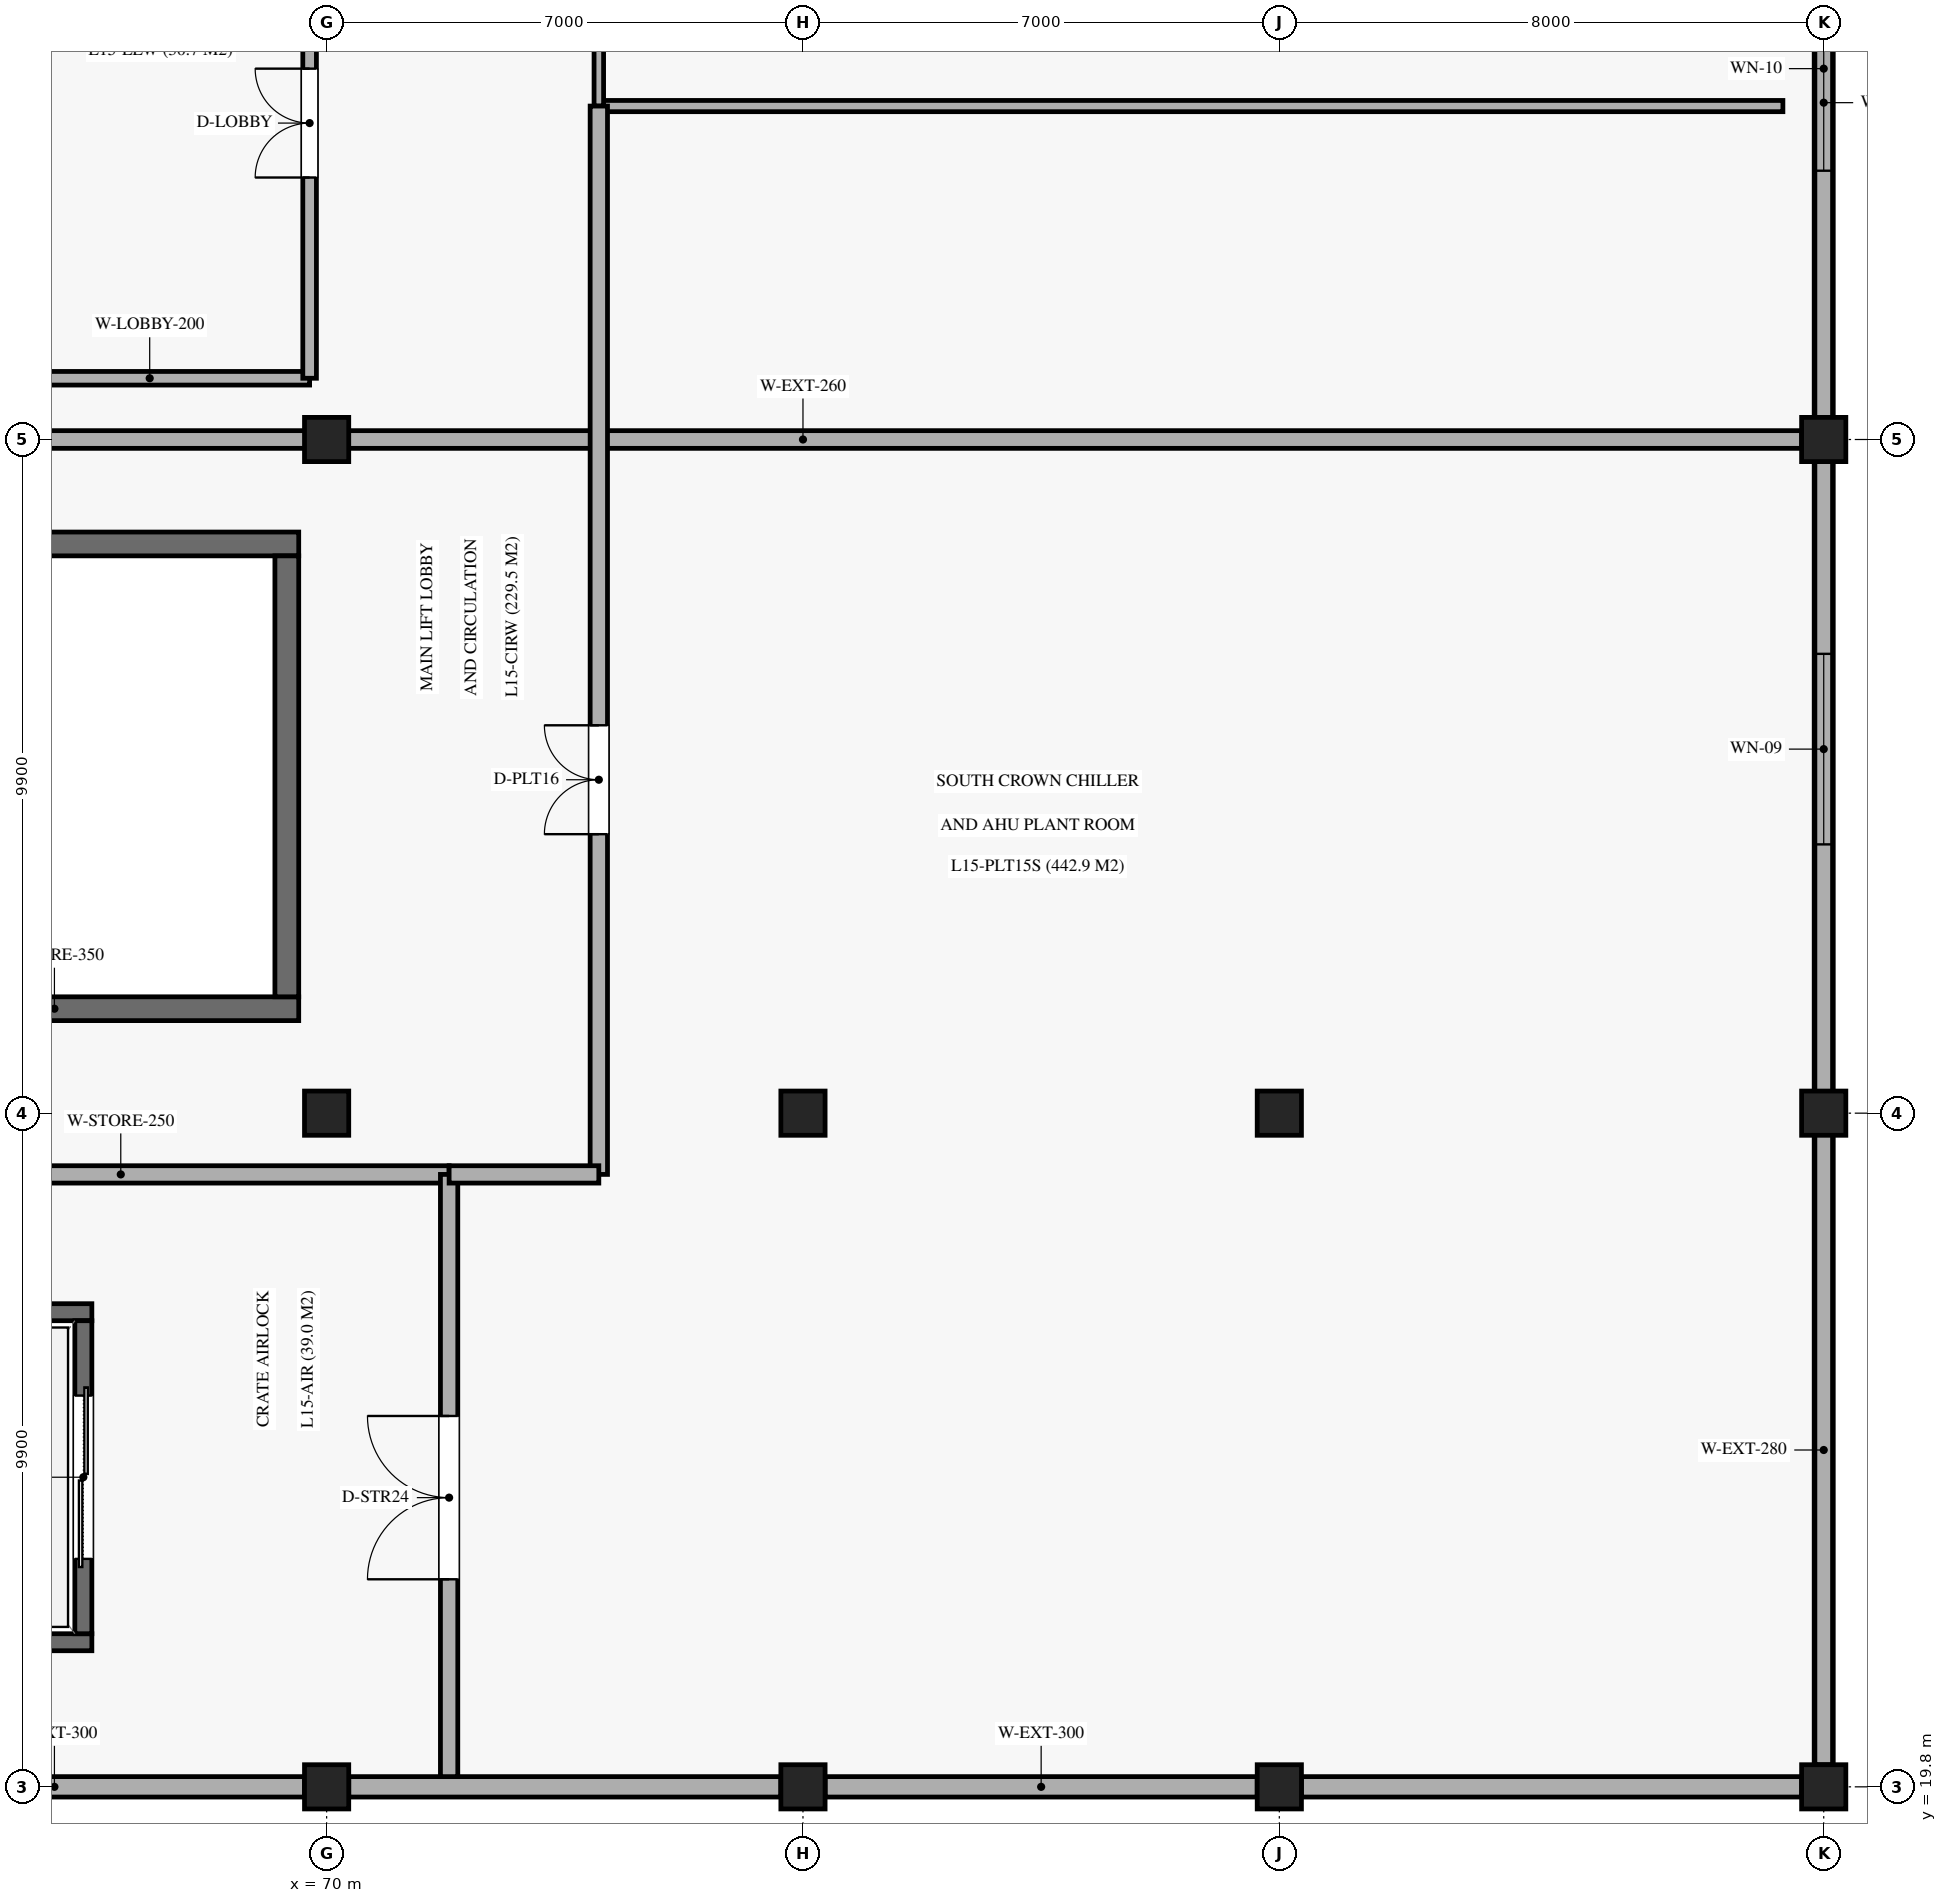
"""IFC4 building model, lengths in metres.
Left out: names, types, materials, properties, quantities, classifications, styles, units other than length and angle.
Written with IfcOpenShell. Run it as: python <this file> out.ifc"""

import sys

from ifc_helpers import new_model, si_unit, direction, frame, frame_2d, origin, origin_2d, place, context, subcontext, project, spatial, polyline, rectangle, outline, extrude, element, fill, save


model = new_model("IFC4")
c1 = context("Model", 3, precision=1e-05, world=origin(), true_north=direction((0.0, 1.0)))
c2 = subcontext(c1, "Body", "Model", "MODEL_VIEW")
j1 = project(units=[si_unit("LENGTHUNIT", "METRE"), si_unit("PLANEANGLEUNIT", "RADIAN")], contexts=[c1])
p1 = place(None, origin())
s1 = spatial("IfcSite", under=j1, at=p1, CompositionType="ELEMENT")
p2 = place(p1, origin())
s2 = spatial("IfcBuilding", under=s1, at=p2, CompositionType="ELEMENT")
p3 = place(p2, frame((0.0, 0.0, 74.46)))
s3 = spatial("IfcBuildingStorey", under=s2, at=p3, CompositionType="ELEMENT", Elevation=74.46)
for number, where, z_axis, x_axis in (
    (1, (70.0, 19.8, 0.0), (0.0, 0.0, 1.0), (1.0, 0.0, 0.0)),
    (2, (70.0, 29.7, 0.0), (0.0, 0.0, 1.0), (1.0, 0.0, 0.0)),
):
    element("IfcColumn", number, at=place(p3, frame(where, z_axis=z_axis, x_axis=x_axis)), inside=s3, PredefinedType="COLUMN", context=c2, shape_type="SweptSolid", body=[
        extrude(rectangle(XDim=0.65, YDim=0.65, at=origin_2d()), origin(), (0.0, 0.0, 1.0), 4.04),
    ])
p4 = place(p3, frame((70.0, 39.6, 0.0), z_axis=(0.0, 0.0, 1.0), x_axis=(1.0, 0.0, 0.0)))
e3 = element("IfcColumn", 3, at=p4, inside=s3, PredefinedType="COLUMN", context=c2, shape_type="SweptSolid", body=[
    extrude(rectangle(XDim=0.65, YDim=0.65, at=origin_2d()), origin(), (0.0, 0.0, 1.0), 5.66),
])
for number, where, z_axis, x_axis in (
    (4, (77.0, 19.8, 0.0), (0.0, 0.0, 1.0), (1.0, 0.0, 0.0)),
    (5, (77.0, 29.7, 0.0), (0.0, 0.0, 1.0), (1.0, 0.0, 0.0)),
    (6, (84.0, 19.8, 0.0), (0.0, 0.0, 1.0), (1.0, 0.0, 0.0)),
    (7, (84.0, 29.7, 0.0), (0.0, 0.0, 1.0), (1.0, 0.0, 0.0)),
    (8, (92.0, 19.8, 0.0), (0.0, 0.0, 1.0), (1.0, 0.0, 0.0)),
    (9, (92.0, 29.7, 0.0), (0.0, 0.0, 1.0), (1.0, 0.0, 0.0)),
):
    element("IfcColumn", number, at=place(p3, frame(where, z_axis=z_axis, x_axis=x_axis)), inside=s3, PredefinedType="COLUMN", context=c2, shape_type="SweptSolid", body=[
        extrude(rectangle(XDim=0.65, YDim=0.65, at=origin_2d()), origin(), (0.0, 0.0, 1.0), 4.04),
    ])
p5 = place(p3, frame((92.0, 39.6, 0.0), z_axis=(0.0, 0.0, 1.0), x_axis=(1.0, 0.0, 0.0)))
e10 = element("IfcColumn", 10, at=p5, inside=s3, PredefinedType="COLUMN", context=c2, shape_type="SweptSolid", body=[
    extrude(rectangle(XDim=0.65, YDim=0.65, at=origin_2d()), origin(), (0.0, 0.0, 1.0), 5.66),
])
p6 = place(p3, frame((92.0, 20.125, 0.0), z_axis=(0.0, 0.0, 1.0), x_axis=(0.0, 1.0, 0.0)))
e11 = element("IfcWall", 11, at=p6, inside=s3, PredefinedType="SOLIDWALL", context=c2, shape_type="SweptSolid", body=[
    extrude(rectangle(XDim=9.25, YDim=0.28, at=frame_2d((4.625, 0.0))), origin(), (0.0, 0.0, 1.0), 3.29),
])
p7 = place(p3, frame((92.0, 30.025, 0.0), z_axis=(0.0, 0.0, 1.0), x_axis=(0.0, 1.0, 0.0)))
e12 = element("IfcWall", 12, at=p7, inside=s3, PredefinedType="SOLIDWALL", context=c2, shape_type="SweptSolid", body=[
    extrude(rectangle(XDim=9.25, YDim=0.28, at=frame_2d((4.625, 0.0))), origin(), (0.0, 0.0, 1.0), 3.29),
])
p8 = place(p7, frame((3.625, 0.0, 1.45)))
e13 = element("IfcOpeningElement", 13, at=p8, cuts=e12, PredefinedType="OPENING", context=c2, shape_type="SweptSolid", body=[
    extrude(rectangle(XDim=2.8, YDim=1.9, at=frame_2d((1.4, 0.95))), frame((0.0, 0.15, 0.0), z_axis=(0.0, -1.0, 0.0), x_axis=(1.0, 0.0, 0.0)), (0.0, 0.0, 1.0), 0.3),
])
p9 = place(p3, frame((92.0, 39.925, 0.0), z_axis=(0.0, 0.0, 1.0), x_axis=(0.0, 1.0, 0.0)))
e14 = element("IfcWall", 14, at=p9, inside=s3, PredefinedType="SOLIDWALL", context=c2, shape_type="SweptSolid", body=[
    extrude(rectangle(XDim=9.25, YDim=0.28, at=frame_2d((4.625, 0.0))), origin(), (0.0, 0.0, 1.0), 3.29),
])
p10 = place(p9, frame((3.625, 0.0, 1.45)))
e15 = element("IfcOpeningElement", 15, at=p10, cuts=e14, PredefinedType="OPENING", context=c2, shape_type="SweptSolid", body=[
    extrude(rectangle(XDim=3.0, YDim=1.95, at=frame_2d((1.5, 0.975))), frame((0.0, 0.15, 0.0), z_axis=(0.0, -1.0, 0.0), x_axis=(1.0, 0.0, 0.0)), (0.0, 0.0, 1.0), 0.3),
])
p11 = place(p3, frame((62.325, 19.8, 0.0), z_axis=(0.0, 0.0, 1.0), x_axis=(1.0, 0.0, 0.0)))
e16 = element("IfcWall", 16, at=p11, inside=s3, PredefinedType="SOLIDWALL", context=c2, shape_type="SweptSolid", body=[
    extrude(rectangle(XDim=7.35, YDim=0.3, at=frame_2d((3.675, 0.0))), origin(), (0.0, 0.0, 1.0), 3.29),
])
for number, where, z_axis, x_axis in (
    (17, (70.325, 19.8, 0.0), (0.0, 0.0, 1.0), (1.0, 0.0, 0.0)),
    (18, (77.325, 19.8, 0.0), (0.0, 0.0, 1.0), (1.0, 0.0, 0.0)),
):
    element("IfcWall", number, at=place(p3, frame(where, z_axis=z_axis, x_axis=x_axis)), inside=s3, PredefinedType="SOLIDWALL", context=c2, shape_type="SweptSolid", body=[
        extrude(rectangle(XDim=6.35, YDim=0.3, at=frame_2d((3.175, 0.0))), origin(), (0.0, 0.0, 1.0), 3.29),
    ])
p12 = place(p3, frame((84.325, 19.8, 0.0), z_axis=(0.0, 0.0, 1.0), x_axis=(1.0, 0.0, 0.0)))
e19 = element("IfcWall", 19, at=p12, inside=s3, PredefinedType="SOLIDWALL", context=c2, shape_type="SweptSolid", body=[
    extrude(rectangle(XDim=7.35, YDim=0.3, at=frame_2d((3.675, 0.0))), origin(), (0.0, 0.0, 1.0), 3.29),
])
p13 = place(p3, frame((62.325, 39.6, 4.04), z_axis=(0.0, 0.0, 1.0), x_axis=(1.0, 0.0, 0.0)))
e20 = element("IfcWall", 20, at=p13, inside=s3, PredefinedType="SOLIDWALL", context=c2, shape_type="SweptSolid", body=[
    extrude(rectangle(XDim=29.35, YDim=0.26, at=frame_2d((14.675, 0.0))), origin(), (0.0, 0.0, 1.0), 1.135),
])
p14 = place(p3, frame((92.0, 20.125, 4.04), z_axis=(0.0, 0.0, 1.0), x_axis=(0.0, 1.0, 0.0)))
e21 = element("IfcWall", 21, at=p14, inside=s3, PredefinedType="SOLIDWALL", context=c2, shape_type="SweptSolid", body=[
    extrude(outline(polyline([(0.0, 0.0), (19.15, 0.0), (19.15, 1.72), (0.0, 0.08), (0.0, 0.0)])), frame((0.0, 0.13, 0.0), z_axis=(0.0, -1.0, 0.0), x_axis=(1.0, 0.0, 0.0)), (0.0, 0.0, 1.0), 0.26),
])
p15 = place(p3, frame((92.0, 39.925, 4.04), z_axis=(0.0, 0.0, 1.0), x_axis=(0.0, 1.0, 0.0)))
e22 = element("IfcWall", 22, at=p15, inside=s3, PredefinedType="SOLIDWALL", context=c2, shape_type="SweptSolid", body=[
    extrude(outline(polyline([(0.0, 0.0), (9.25, 0.0), (9.25, 3.62), (0.0, 0.1), (0.0, 0.0)])), frame((0.0, 0.13, 0.0), z_axis=(0.0, -1.0, 0.0), x_axis=(1.0, 0.0, 0.0)), (0.0, 0.0, 1.0), 0.26),
])
p16 = place(p3, frame((92.35, 39.71, 0.0), z_axis=(0.0, 0.0, 1.0), x_axis=(1.0, 0.0, 0.0)))
e23 = element("IfcWall", 23, at=p16, inside=s3, PredefinedType="PARAPET", context=c2, shape_type="SweptSolid", body=[
    extrude(rectangle(XDim=5.3, YDim=0.22, at=frame_2d((2.65, 0.0))), origin(), (0.0, 0.0, 1.0), 0.48),
])
p17 = place(p3, frame((62.41, 31.235, 0.0), z_axis=(0.0, 0.0, 1.0), x_axis=(1.0, 0.0, 0.0)))
e24 = element("IfcWall", 24, at=p17, inside=s3, PredefinedType="SHEAR", context=c2, shape_type="SweptSolid", body=[
    extrude(rectangle(XDim=7.18, YDim=0.35, at=frame_2d((3.59, 0.0))), origin(), (0.0, 0.0, 1.0), 4.04),
])
p18 = place(p17, frame((0.77, 0.0, 0.0)))
e25 = element("IfcOpeningElement", 25, at=p18, cuts=e24, PredefinedType="OPENING", context=c2, shape_type="SweptSolid", body=[
    extrude(rectangle(XDim=1.2, YDim=2.2, at=frame_2d((0.6, 1.1))), frame((0.0, 0.185, 0.0), z_axis=(0.0, -1.0, 0.0), x_axis=(1.0, 0.0, 0.0)), (0.0, 0.0, 1.0), 0.37),
])
p19 = place(p3, frame((62.41, 38.065, 0.0), z_axis=(0.0, 0.0, 1.0), x_axis=(1.0, 0.0, 0.0)))
e26 = element("IfcWall", 26, at=p19, inside=s3, PredefinedType="SHEAR", context=c2, shape_type="SweptSolid", body=[
    extrude(rectangle(XDim=7.18, YDim=0.35, at=frame_2d((3.59, 0.0))), origin(), (0.0, 0.0, 1.0), 4.04),
])
p20 = place(p3, frame((69.415, 31.41, 0.0), z_axis=(0.0, 0.0, 1.0), x_axis=(0.0, 1.0, 0.0)))
e27 = element("IfcWall", 27, at=p20, inside=s3, PredefinedType="SHEAR", context=c2, shape_type="SweptSolid", body=[
    extrude(rectangle(XDim=6.48, YDim=0.35, at=frame_2d((3.24, 0.0))), origin(), (0.0, 0.0, 1.0), 4.04),
])
for number, where, z_axis, x_axis in (
    (28, (62.65, 21.925, 0.0), (0.0, 0.0, 1.0), (1.0, 0.0, 0.0)),
    (29, (62.65, 26.775, 0.0), (0.0, 0.0, 1.0), (1.0, 0.0, 0.0)),
):
    element("IfcWall", number, at=place(p3, frame(where, z_axis=z_axis, x_axis=x_axis)), inside=s3, PredefinedType="SOLIDWALL", context=c2, shape_type="SweptSolid", body=[
        extrude(rectangle(XDim=3.9, YDim=0.25, at=frame_2d((1.95, 0.0))), origin(), (0.0, 0.0, 1.0), 4.02),
    ])
p21 = place(p3, frame((66.425, 22.05, 0.0), z_axis=(0.0, 0.0, 1.0), x_axis=(0.0, 1.0, 0.0)))
e30 = element("IfcWall", 30, at=p21, inside=s3, PredefinedType="SOLIDWALL", context=c2, shape_type="SweptSolid", body=[
    extrude(rectangle(XDim=4.6, YDim=0.25, at=frame_2d((2.3, 0.0))), origin(), (0.0, 0.0, 1.0), 4.02),
])
p22 = place(p21, frame((1.1, 0.0, 0.0)))
e31 = element("IfcOpeningElement", 31, at=p22, cuts=e30, PredefinedType="OPENING", context=c2, shape_type="SweptSolid", body=[
    extrude(rectangle(XDim=2.4, YDim=2.65, at=frame_2d((1.2, 1.325))), frame((0.0, 0.135, 0.0), z_axis=(0.0, -1.0, 0.0), x_axis=(1.0, 0.0, 0.0)), (0.0, 0.0, 1.0), 0.27),
])
p23 = place(p3, frame((65.05, 40.5, 0.0), z_axis=(0.0, 0.0, 1.0), x_axis=(1.0, 0.0, 0.0)))
e32 = element("IfcWall", 32, at=p23, inside=s3, PredefinedType="SOLIDWALL", context=c2, shape_type="SweptSolid", body=[
    extrude(rectangle(XDim=4.7, YDim=0.2, at=frame_2d((2.35, 0.0))), origin(), (0.0, 0.0, 1.0), 3.16),
])
p24 = place(p3, frame((69.75, 40.5, 0.0), z_axis=(0.0, 0.0, 1.0), x_axis=(0.0, 1.0, 0.0)))
e33 = element("IfcWall", 33, at=p24, inside=s3, PredefinedType="SOLIDWALL", context=c2, shape_type="SweptSolid", body=[
    extrude(rectangle(XDim=7.5, YDim=0.2, at=frame_2d((3.75, 0.0))), origin(), (0.0, 0.0, 1.0), 3.16),
])
p25 = place(p24, frame((2.95, 0.0, 0.0)))
e34 = element("IfcOpeningElement", 34, at=p25, cuts=e33, PredefinedType="OPENING", context=c2, shape_type="SweptSolid", body=[
    extrude(rectangle(XDim=1.6, YDim=2.2, at=frame_2d((0.8, 1.1))), frame((0.0, 0.11, 0.0), z_axis=(0.0, -1.0, 0.0), x_axis=(1.0, 0.0, 0.0)), (0.0, 0.0, 1.0), 0.22),
])
p26 = place(p3, frame((62.15, 28.8, 0.0), z_axis=(0.0, 0.0, 1.0), x_axis=(1.0, 0.0, 0.0)))
e35 = element("IfcWall", 35, at=p26, inside=s3, PredefinedType="SOLIDWALL", context=c2, shape_type="SweptSolid", body=[
    extrude(rectangle(XDim=9.65, YDim=0.255, at=frame_2d((4.825, 0.0))), origin(), (0.0, 0.0, 1.0), 3.16),
])
p27 = place(p3, frame((71.8, 19.95, 0.0), z_axis=(0.0, 0.0, 1.0), x_axis=(0.0, 1.0, 0.0)))
e36 = element("IfcWall", 36, at=p27, inside=s3, PredefinedType="SOLIDWALL", context=c2, shape_type="SweptSolid", body=[
    extrude(rectangle(XDim=8.85, YDim=0.255, at=frame_2d((4.425, 0.0))), origin(), (0.0, 0.0, 1.0), 3.16),
])
p28 = place(p27, frame((2.9, 0.0, 0.0)))
e37 = element("IfcOpeningElement", 37, at=p28, cuts=e36, PredefinedType="OPENING", context=c2, shape_type="SweptSolid", body=[
    extrude(rectangle(XDim=2.4, YDim=2.5, at=frame_2d((1.2, 1.25))), frame((0.0, 0.137, 0.0), z_axis=(0.0, -1.0, 0.0), x_axis=(1.0, 0.0, 0.0)), (0.0, 0.0, 1.0), 0.275),
])
p29 = place(p3, frame((74.0, 44.5, 0.0), z_axis=(0.0, 0.0, 1.0), x_axis=(1.0, 0.0, 0.0)))
e38 = element("IfcWall", 38, at=p29, inside=s3, PredefinedType="PARTITIONING", context=c2, shape_type="SweptSolid", body=[
    extrude(rectangle(XDim=17.4, YDim=0.165, at=frame_2d((8.7, 0.0))), origin(), (0.0, 0.0, 1.0), 3.16),
])
p30 = place(p3, frame((74.0, 44.5, 0.0), z_axis=(0.0, 0.0, 1.0), x_axis=(0.0, 1.0, 0.0)))
e39 = element("IfcWall", 39, at=p30, inside=s3, PredefinedType="PARTITIONING", context=c2, shape_type="SweptSolid", body=[
    extrude(rectangle(XDim=39.5, YDim=0.14, at=frame_2d((19.75, 0.0))), origin(), (0.0, 0.0, 1.0), 3.16),
])
p31 = place(p30, frame((16.0, 0.0, 0.0)))
e40 = element("IfcOpeningElement", 40, at=p31, cuts=e39, PredefinedType="OPENING", context=c2, shape_type="SweptSolid", body=[
    extrude(rectangle(XDim=2.0, YDim=2.5, at=frame_2d((1.0, 1.25))), frame((0.0, 0.08, 0.0), z_axis=(0.0, -1.0, 0.0), x_axis=(1.0, 0.0, 0.0)), (0.0, 0.0, 1.0), 0.16),
])
p32 = place(p3, frame((74.0, 28.8, 0.0), z_axis=(0.0, 0.0, 1.0), x_axis=(0.0, 1.0, 0.0)))
e41 = element("IfcWall", 41, at=p32, inside=s3, PredefinedType="SOLIDWALL", context=c2, shape_type="SweptSolid", body=[
    extrude(rectangle(XDim=15.7, YDim=0.255, at=frame_2d((7.85, 0.0))), origin(), (0.0, 0.0, 1.0), 3.16),
])
p33 = place(p32, frame((5.0, 0.0, 0.0)))
e42 = element("IfcOpeningElement", 42, at=p33, cuts=e41, PredefinedType="OPENING", context=c2, shape_type="SweptSolid", body=[
    extrude(rectangle(XDim=1.6, YDim=2.25, at=frame_2d((0.8, 1.125))), frame((0.0, 0.137, 0.0), z_axis=(0.0, -1.0, 0.0), x_axis=(1.0, 0.0, 0.0)), (0.0, 0.0, 1.0), 0.275),
])
p34 = place(p3, frame((71.8, 28.8, 0.0), z_axis=(0.0, 0.0, 1.0), x_axis=(1.0, 0.0, 0.0)))
e43 = element("IfcWall", 43, at=p34, inside=s3, PredefinedType="SOLIDWALL", context=c2, shape_type="SweptSolid", body=[
    extrude(rectangle(XDim=2.2, YDim=0.255, at=frame_2d((1.1, 0.0))), origin(), (0.0, 0.0, 1.0), 3.16),
])
p35 = place(p8, origin())
e44 = element("IfcWindow", 44, at=p35, inside=s3, PartitioningType="SINGLE_PANEL", PredefinedType="WINDOW", context=c2, shape_type="SweptSolid", body=[
    extrude(rectangle(XDim=2.8, YDim=1.9, at=frame_2d((1.4, 0.95))), frame((0.0, 0.03, 0.0), z_axis=(0.0, -1.0, 0.0), x_axis=(1.0, 0.0, 0.0)), (0.0, 0.0, 1.0), 0.06),
])
fill(e13, e44)
p36 = place(p10, origin())
e45 = element("IfcWindow", 45, at=p36, inside=s3, PartitioningType="SINGLE_PANEL", PredefinedType="WINDOW", context=c2, shape_type="SweptSolid", body=[
    extrude(rectangle(XDim=3.0, YDim=1.95, at=frame_2d((1.5, 0.975))), frame((0.0, 0.03, 0.0), z_axis=(0.0, -1.0, 0.0), x_axis=(1.0, 0.0, 0.0)), (0.0, 0.0, 1.0), 0.06),
])
fill(e15, e45)
p37 = place(p22, origin())
e46 = element("IfcDoor", 46, at=p37, inside=s3, OperationType="DOUBLE_DOOR_SLIDING", PredefinedType="DOOR", context=c2, shape_type="SweptSolid", body=[
    extrude(rectangle(XDim=2.4, YDim=2.65, at=frame_2d((1.2, 1.325))), frame((0.0, 0.025, 0.0), z_axis=(0.0, -1.0, 0.0), x_axis=(1.0, 0.0, 0.0)), (0.0, 0.0, 1.0), 0.05),
])
fill(e31, e46)
p38 = place(p25, origin())
e47 = element("IfcDoor", 47, at=p38, inside=s3, OperationType="DOUBLE_DOOR_SINGLE_SWING", PredefinedType="DOOR", context=c2, shape_type="SweptSolid", body=[
    extrude(rectangle(XDim=1.6, YDim=2.2, at=frame_2d((0.8, 1.1))), frame((0.0, 0.025, 0.0), z_axis=(0.0, -1.0, 0.0), x_axis=(1.0, 0.0, 0.0)), (0.0, 0.0, 1.0), 0.05),
])
fill(e34, e47)
p39 = place(p28, origin())
e48 = element("IfcDoor", 48, at=p39, inside=s3, OperationType="DOUBLE_DOOR_SINGLE_SWING", PredefinedType="DOOR", context=c2, shape_type="SweptSolid", body=[
    extrude(rectangle(XDim=2.4, YDim=2.5, at=frame_2d((1.2, 1.25))), frame((0.0, 0.025, 0.0), z_axis=(0.0, -1.0, 0.0), x_axis=(1.0, 0.0, 0.0)), (0.0, 0.0, 1.0), 0.05),
])
fill(e37, e48)
p40 = place(p33, origin())
e49 = element("IfcDoor", 49, at=p40, inside=s3, OperationType="DOUBLE_DOOR_SINGLE_SWING", PredefinedType="DOOR", context=c2, shape_type="SweptSolid", body=[
    extrude(rectangle(XDim=1.6, YDim=2.25, at=frame_2d((0.8, 1.125))), frame((0.0, 0.025, 0.0), z_axis=(0.0, -1.0, 0.0), x_axis=(1.0, 0.0, 0.0)), (0.0, 0.0, 1.0), 0.05),
])
fill(e42, e49)
save(model, sys.argv[1])
